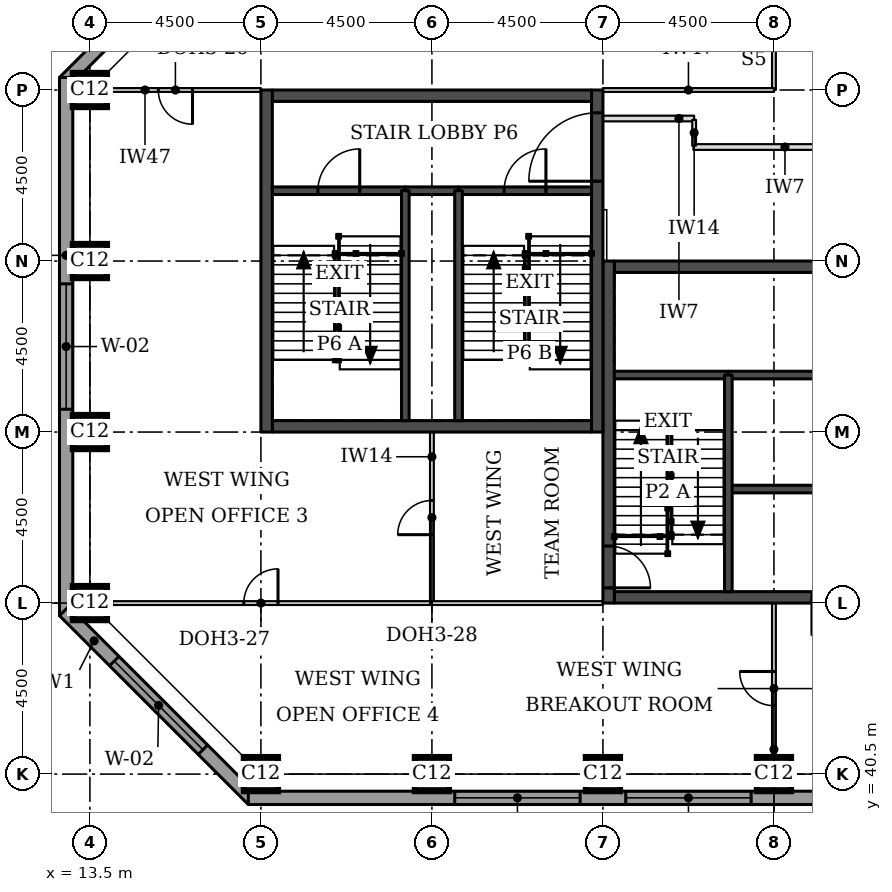
"""IFC4 building model, lengths in metres.
Left out: names, types, materials, properties, quantities, classifications, styles, units other than length and angle.
Written with IfcOpenShell. Run it as: python <this file> out.ifc"""

import sys

from ifc_helpers import new_model, si_unit, direction, frame, frame_2d, origin, origin_2d, place, context, subcontext, project, spatial, rectangle, extrude, element, fill, save


model = new_model("IFC4")
c1 = context("Model", 3, precision=1e-05, world=origin(), true_north=direction((0.0, 1.0)))
c2 = subcontext(c1, "Body", "Model", "MODEL_VIEW")
j1 = project(units=[si_unit("LENGTHUNIT", "METRE"), si_unit("PLANEANGLEUNIT", "RADIAN")], contexts=[c1])
p1 = place(None, origin())
s1 = spatial("IfcSite", under=j1, at=p1, CompositionType="ELEMENT")
p2 = place(p1, origin())
s2 = spatial("IfcBuilding", under=s1, at=p2, CompositionType="ELEMENT")
p3 = place(p2, frame((0.0, 0.0, 166.2)))
s3 = spatial("IfcBuildingStorey", under=s2, at=p3, CompositionType="ELEMENT", Elevation=166.2)
for number, where, z_axis, x_axis in (
    (1, (18.0, 40.5, 0.0), (0.0, 0.0, 1.0), (1.0, 0.0, 0.0)),
    (2, (22.5, 40.5, 0.0), (0.0, 0.0, 1.0), (1.0, 0.0, 0.0)),
    (3, (27.0, 40.5, 0.0), (0.0, 0.0, 1.0), (1.0, 0.0, 0.0)),
    (4, (31.5, 40.5, 0.0), (0.0, 0.0, 1.0), (1.0, 0.0, 0.0)),
    (5, (13.5, 45.0, 0.0), (0.0, 0.0, 1.0), (1.0, 0.0, 0.0)),
    (6, (13.5, 49.5, 0.0), (0.0, 0.0, 1.0), (1.0, 0.0, 0.0)),
    (7, (13.5, 54.0, 0.0), (0.0, 0.0, 1.0), (1.0, 0.0, 0.0)),
    (8, (13.5, 58.5, 0.0), (0.0, 0.0, 1.0), (1.0, 0.0, 0.0)),
):
    element("IfcColumn", number, at=place(p3, frame(where, z_axis=z_axis, x_axis=x_axis)), inside=s3, PredefinedType="COLUMN", context=c2, shape_type="SweptSolid", body=[
        extrude(rectangle(XDim=0.9, YDim=0.9, at=origin_2d()), origin(), (0.0, 0.0, 1.0), 3.7),
    ])
p4 = place(p3, frame((27.3, 45.15, 0.0), z_axis=(0.0, 0.0, 1.0), x_axis=(1.0, 0.0, 0.0)))
e9 = element("IfcWall", 9, at=p4, inside=s3, PredefinedType="SHEAR", context=c2, shape_type="SweptSolid", body=[
    extrude(rectangle(XDim=8.4, YDim=0.3, at=frame_2d((4.2, 0.0))), origin(), (0.0, 0.0, 1.0), 3.7),
])
p5 = place(p4, frame((5.2, 0.0, 0.0)))
e10 = element("IfcOpeningElement", 10, at=p5, cuts=e9, PredefinedType="OPENING", context=c2, shape_type="SweptSolid", body=[
    extrude(rectangle(XDim=1.0, YDim=2.1, at=frame_2d((0.5, 1.05))), frame((0.0, 0.16, 0.0), z_axis=(0.0, -1.0, 0.0), x_axis=(1.0, 0.0, 0.0)), (0.0, 0.0, 1.0), 0.32),
])
p6 = place(p3, frame((27.3, 53.85, 0.0), z_axis=(0.0, 0.0, 1.0), x_axis=(1.0, 0.0, 0.0)))
e11 = element("IfcWall", 11, at=p6, inside=s3, PredefinedType="SHEAR", context=c2, shape_type="SweptSolid", body=[
    extrude(rectangle(XDim=8.4, YDim=0.3, at=frame_2d((4.2, 0.0))), origin(), (0.0, 0.0, 1.0), 3.7),
])
p7 = place(p6, frame((6.4, 0.0, 0.0)))
e12 = element("IfcOpeningElement", 12, at=p7, cuts=e11, PredefinedType="OPENING", context=c2, shape_type="SweptSolid", body=[
    extrude(rectangle(XDim=1.1, YDim=2.1, at=frame_2d((0.55, 1.05))), frame((0.0, 0.16, 0.0), z_axis=(0.0, -1.0, 0.0), x_axis=(1.0, 0.0, 0.0)), (0.0, 0.0, 1.0), 0.32),
])
p8 = place(p3, frame((27.15, 45.0, 0.0), z_axis=(0.0, 0.0, 1.0), x_axis=(0.0, 1.0, 0.0)))
e13 = element("IfcWall", 13, at=p8, inside=s3, PredefinedType="SHEAR", context=c2, shape_type="SweptSolid", body=[
    extrude(rectangle(XDim=9.0, YDim=0.3, at=frame_2d((4.5, 0.0))), origin(), (0.0, 0.0, 1.0), 3.7),
])
p9 = place(p8, frame((0.4, 0.0, 0.0)))
e14 = element("IfcOpeningElement", 14, at=p9, cuts=e13, PredefinedType="OPENING", context=c2, shape_type="SweptSolid", body=[
    extrude(rectangle(XDim=1.1, YDim=2.1, at=frame_2d((0.55, 1.05))), frame((0.0, 0.16, 0.0), z_axis=(0.0, -1.0, 0.0), x_axis=(1.0, 0.0, 0.0)), (0.0, 0.0, 1.0), 0.32),
])
for number, where, z_axis, x_axis in (
    (15, (18.3, 49.65, 0.0), (0.0, 0.0, 1.0), (1.0, 0.0, 0.0)),
    (16, (18.3, 58.35, 0.0), (0.0, 0.0, 1.0), (1.0, 0.0, 0.0)),
):
    element("IfcWall", number, at=place(p3, frame(where, z_axis=z_axis, x_axis=x_axis)), inside=s3, PredefinedType="SHEAR", context=c2, shape_type="SweptSolid", body=[
        extrude(rectangle(XDim=8.4, YDim=0.3, at=frame_2d((4.2, 0.0))), origin(), (0.0, 0.0, 1.0), 3.7),
    ])
p10 = place(p3, frame((18.15, 49.5, 0.0), z_axis=(0.0, 0.0, 1.0), x_axis=(0.0, 1.0, 0.0)))
e17 = element("IfcWall", 17, at=p10, inside=s3, PredefinedType="SHEAR", context=c2, shape_type="SweptSolid", body=[
    extrude(rectangle(XDim=9.0, YDim=0.3, at=frame_2d((4.5, 0.0))), origin(), (0.0, 0.0, 1.0), 3.7),
])
p11 = place(p3, frame((26.85, 49.5, 0.0), z_axis=(0.0, 0.0, 1.0), x_axis=(0.0, 1.0, 0.0)))
e18 = element("IfcWall", 18, at=p11, inside=s3, PredefinedType="SHEAR", context=c2, shape_type="SweptSolid", body=[
    extrude(rectangle(XDim=9.0, YDim=0.3, at=frame_2d((4.5, 0.0))), origin(), (0.0, 0.0, 1.0), 3.7),
])
p12 = place(p11, frame((6.6, 0.0, 0.0)))
e19 = element("IfcOpeningElement", 19, at=p12, cuts=e18, PredefinedType="OPENING", context=c2, shape_type="SweptSolid", body=[
    extrude(rectangle(XDim=1.8, YDim=2.1, at=frame_2d((0.9, 1.05))), frame((0.0, 0.16, 0.0), z_axis=(0.0, -1.0, 0.0), x_axis=(1.0, 0.0, 0.0)), (0.0, 0.0, 1.0), 0.32),
])
p13 = place(p3, frame((17.792, 63.676, 0.0), z_axis=(0.0, 0.0, 1.0), x_axis=(-0.707106781187, -0.707106781187, 0.0)))
e20 = element("IfcWall", 20, at=p13, inside=s3, PredefinedType="STANDARD", context=c2, shape_type="SweptSolid", body=[
    extrude(rectangle(XDim=7.027, YDim=0.35, at=frame_2d((3.513, 0.0))), origin(), (0.0, 0.0, 1.0), 3.525),
])
p14 = place(p13, frame((1.863, 0.0, 0.9)))
e21 = element("IfcOpeningElement", 21, at=p14, cuts=e20, PredefinedType="OPENING", context=c2, shape_type="SweptSolid", body=[
    extrude(rectangle(XDim=3.3, YDim=1.9, at=frame_2d((1.65, 0.95))), frame((0.0, 0.185, 0.0), z_axis=(0.0, -1.0, 0.0), x_axis=(1.0, 0.0, 0.0)), (0.0, 0.0, 1.0), 0.37),
])
p15 = place(p3, frame((12.875, 58.831, 0.0), z_axis=(0.0, 0.0, 1.0), x_axis=(0.0, -1.0, 0.0)))
e22 = element("IfcWall", 22, at=p15, inside=s3, PredefinedType="STANDARD", context=c2, shape_type="SweptSolid", body=[
    extrude(rectangle(XDim=14.163, YDim=0.35, at=frame_2d((7.081, 0.0))), origin(), (0.0, 0.0, 1.0), 3.525),
])
p16 = place(p15, frame((5.431, 0.0, 0.9)))
e23 = element("IfcOpeningElement", 23, at=p16, cuts=e22, PredefinedType="OPENING", context=c2, shape_type="SweptSolid", body=[
    extrude(rectangle(XDim=3.3, YDim=1.9, at=frame_2d((1.65, 0.95))), frame((0.0, 0.185, 0.0), z_axis=(0.0, -1.0, 0.0), x_axis=(1.0, 0.0, 0.0)), (0.0, 0.0, 1.0), 0.37),
])
p17 = place(p3, frame((12.824, 44.792, 0.0), z_axis=(0.0, 0.0, 1.0), x_axis=(0.707106781187, -0.707106781187, 0.0)))
e24 = element("IfcWall", 24, at=p17, inside=s3, PredefinedType="STANDARD", context=c2, shape_type="SweptSolid", body=[
    extrude(rectangle(XDim=7.027, YDim=0.35, at=frame_2d((3.513, 0.0))), origin(), (0.0, 0.0, 1.0), 3.525),
])
p18 = place(p17, frame((1.863, 0.0, 0.9)))
e25 = element("IfcOpeningElement", 25, at=p18, cuts=e24, PredefinedType="OPENING", context=c2, shape_type="SweptSolid", body=[
    extrude(rectangle(XDim=3.3, YDim=1.9, at=frame_2d((1.65, 0.95))), frame((0.0, 0.185, 0.0), z_axis=(0.0, -1.0, 0.0), x_axis=(1.0, 0.0, 0.0)), (0.0, 0.0, 1.0), 0.37),
])
p19 = place(p3, frame((17.669, 39.875, 0.0), z_axis=(0.0, 0.0, 1.0), x_axis=(1.0, 0.0, 0.0)))
e26 = element("IfcWall", 26, at=p19, inside=s3, PredefinedType="STANDARD", context=c2, shape_type="SweptSolid", body=[
    extrude(rectangle(XDim=18.331, YDim=0.35, at=frame_2d((9.166, 0.0))), origin(), (0.0, 0.0, 1.0), 3.525),
])
p20 = place(p19, frame((5.431, 0.0, 0.9)))
e27 = element("IfcOpeningElement", 27, at=p20, cuts=e26, PredefinedType="OPENING", context=c2, shape_type="SweptSolid", body=[
    extrude(rectangle(XDim=3.3, YDim=1.9, at=frame_2d((1.65, 0.95))), frame((0.0, 0.185, 0.0), z_axis=(0.0, -1.0, 0.0), x_axis=(1.0, 0.0, 0.0)), (0.0, 0.0, 1.0), 0.37),
])
p21 = place(p19, frame((9.931, 0.0, 0.9)))
e28 = element("IfcOpeningElement", 28, at=p21, cuts=e26, PredefinedType="OPENING", context=c2, shape_type="SweptSolid", body=[
    extrude(rectangle(XDim=3.3, YDim=1.9, at=frame_2d((1.65, 0.95))), frame((0.0, 0.185, 0.0), z_axis=(0.0, -1.0, 0.0), x_axis=(1.0, 0.0, 0.0)), (0.0, 0.0, 1.0), 0.37),
])
p22 = place(p3, frame((29.38, 57.0, 0.0), z_axis=(0.0, 0.0, 1.0), x_axis=(1.0, 0.0, 0.0)))
e29 = element("IfcWall", 29, at=p22, inside=s3, PredefinedType="PARTITIONING", context=c2, shape_type="SweptSolid", body=[
    extrude(rectangle(XDim=9.62, YDim=0.15, at=frame_2d((4.81, 0.0))), origin(), (0.0, 0.0, 1.0), 3.55),
])
p23 = place(p22, frame((5.13, 0.0, 0.0)))
e30 = element("IfcOpeningElement", 30, at=p23, cuts=e29, PredefinedType="OPENING", context=c2, shape_type="SweptSolid", body=[
    extrude(rectangle(XDim=1.0, YDim=2.1, at=frame_2d((0.5, 1.05))), frame((0.0, 0.085, 0.0), z_axis=(0.0, -1.0, 0.0), x_axis=(1.0, 0.0, 0.0)), (0.0, 0.0, 1.0), 0.17),
])
p24 = place(p3, frame((31.5, 63.0, 0.0), z_axis=(0.0, 0.0, 1.0), x_axis=(0.0, -1.0, 0.0)))
e31 = element("IfcWall", 31, at=p24, inside=s3, PredefinedType="PARTITIONING", context=c2, shape_type="SweptSolid", body=[
    extrude(rectangle(XDim=4.5, YDim=0.1, at=frame_2d((2.25, 0.0))), origin(), (0.0, 0.0, 1.0), 3.55),
])
p25 = place(p24, frame((1.8, 0.0, 0.0)))
e32 = element("IfcOpeningElement", 32, at=p25, cuts=e31, PredefinedType="OPENING", context=c2, shape_type="SweptSolid", body=[
    extrude(rectangle(XDim=0.9, YDim=2.1, at=frame_2d((0.45, 1.05))), frame((0.0, 0.06, 0.0), z_axis=(0.0, -1.0, 0.0), x_axis=(1.0, 0.0, 0.0)), (0.0, 0.0, 1.0), 0.12),
])
p26 = place(p3, frame((31.5, 58.5, 0.0), z_axis=(0.0, 0.0, 1.0), x_axis=(-1.0, 0.0, 0.0)))
e33 = element("IfcWall", 33, at=p26, inside=s3, PredefinedType="PARTITIONING", context=c2, shape_type="SweptSolid", body=[
    extrude(rectangle(XDim=4.5, YDim=0.1, at=frame_2d((2.25, 0.0))), origin(), (0.0, 0.0, 1.0), 2.55),
])
p27 = place(p3, frame((13.5, 58.5, 0.0), z_axis=(0.0, 0.0, 1.0), x_axis=(1.0, 0.0, 0.0)))
e34 = element("IfcWall", 34, at=p27, inside=s3, PredefinedType="PARTITIONING", context=c2, shape_type="SweptSolid", body=[
    extrude(rectangle(XDim=4.5, YDim=0.1, at=frame_2d((2.25, 0.0))), origin(), (0.0, 0.0, 1.0), 2.55),
])
p28 = place(p27, frame((1.8, 0.0, 0.0)))
e35 = element("IfcOpeningElement", 35, at=p28, cuts=e34, PredefinedType="OPENING", context=c2, shape_type="SweptSolid", body=[
    extrude(rectangle(XDim=0.9, YDim=2.1, at=frame_2d((0.45, 1.05))), frame((0.0, 0.06, 0.0), z_axis=(0.0, -1.0, 0.0), x_axis=(1.0, 0.0, 0.0)), (0.0, 0.0, 1.0), 0.12),
])
p29 = place(p3, frame((22.5, 45.0, 0.0), z_axis=(0.0, 0.0, 1.0), x_axis=(-1.0, 0.0, 0.0)))
e36 = element("IfcWall", 36, at=p29, inside=s3, PredefinedType="PARTITIONING", context=c2, shape_type="SweptSolid", body=[
    extrude(rectangle(XDim=9.0, YDim=0.1, at=frame_2d((4.5, 0.0))), origin(), (0.0, 0.0, 1.0), 2.55),
])
p30 = place(p29, frame((4.05, 0.0, 0.0)))
e37 = element("IfcOpeningElement", 37, at=p30, cuts=e36, PredefinedType="OPENING", context=c2, shape_type="SweptSolid", body=[
    extrude(rectangle(XDim=0.9, YDim=2.1, at=frame_2d((0.45, 1.05))), frame((0.0, 0.06, 0.0), z_axis=(0.0, -1.0, 0.0), x_axis=(1.0, 0.0, 0.0)), (0.0, 0.0, 1.0), 0.12),
])
p31 = place(p3, frame((22.5, 49.5, 0.0), z_axis=(0.0, 0.0, 1.0), x_axis=(0.0, -1.0, 0.0)))
e38 = element("IfcWall", 38, at=p31, inside=s3, PredefinedType="PARTITIONING", context=c2, shape_type="SweptSolid", body=[
    extrude(rectangle(XDim=4.5, YDim=0.1, at=frame_2d((2.25, 0.0))), origin(), (0.0, 0.0, 1.0), 3.55),
])
p32 = place(p31, frame((1.8, 0.0, 0.0)))
e39 = element("IfcOpeningElement", 39, at=p32, cuts=e38, PredefinedType="OPENING", context=c2, shape_type="SweptSolid", body=[
    extrude(rectangle(XDim=0.9, YDim=2.1, at=frame_2d((0.45, 1.05))), frame((0.0, 0.06, 0.0), z_axis=(0.0, -1.0, 0.0), x_axis=(1.0, 0.0, 0.0)), (0.0, 0.0, 1.0), 0.12),
])
p33 = place(p3, frame((22.5, 45.0, 0.0), z_axis=(0.0, 0.0, 1.0), x_axis=(1.0, 0.0, 0.0)))
e40 = element("IfcWall", 40, at=p33, inside=s3, PredefinedType="PARTITIONING", context=c2, shape_type="SweptSolid", body=[
    extrude(rectangle(XDim=4.5, YDim=0.1, at=frame_2d((2.25, 0.0))), origin(), (0.0, 0.0, 1.0), 2.55),
])
p34 = place(p3, frame((31.5, 45.0, 0.0), z_axis=(0.0, 0.0, 1.0), x_axis=(0.0, -1.0, 0.0)))
e41 = element("IfcWall", 41, at=p34, inside=s3, PredefinedType="PARTITIONING", context=c2, shape_type="SweptSolid", body=[
    extrude(rectangle(XDim=4.5, YDim=0.1, at=frame_2d((2.25, 0.0))), origin(), (0.0, 0.0, 1.0), 3.55),
])
p35 = place(p34, frame((1.8, 0.0, 0.0)))
e42 = element("IfcOpeningElement", 42, at=p35, cuts=e41, PredefinedType="OPENING", context=c2, shape_type="SweptSolid", body=[
    extrude(rectangle(XDim=0.9, YDim=2.1, at=frame_2d((0.45, 1.05))), frame((0.0, 0.06, 0.0), z_axis=(0.0, -1.0, 0.0), x_axis=(1.0, 0.0, 0.0)), (0.0, 0.0, 1.0), 0.12),
])
p36 = place(p3, frame((27.0, 57.75, 0.0), z_axis=(0.0, 0.0, 1.0), x_axis=(1.0, 0.0, 0.0)))
e43 = element("IfcWall", 43, at=p36, inside=s3, PredefinedType="PARTITIONING", context=c2, shape_type="SweptSolid", body=[
    extrude(rectangle(XDim=2.4, YDim=0.15, at=frame_2d((1.2, 0.0))), origin(), (0.0, 0.0, 1.0), 3.55),
])
p37 = place(p3, frame((29.4, 57.715, 0.0), z_axis=(0.0, 0.0, 1.0), x_axis=(0.0, -1.0, 0.0)))
e44 = element("IfcWall", 44, at=p37, inside=s3, PredefinedType="PARTITIONING", context=c2, shape_type="SweptSolid", body=[
    extrude(rectangle(XDim=0.68, YDim=0.1, at=frame_2d((0.34, 0.0))), origin(), (0.0, 0.0, 1.0), 3.55),
])
p38 = place(p3, frame((30.3, 48.0, 0.0), z_axis=(0.0, 0.0, 1.0), x_axis=(1.0, 0.0, 0.0)))
e45 = element("IfcWall", 45, at=p38, inside=s3, PredefinedType="SOLIDWALL", context=c2, shape_type="SweptSolid", body=[
    extrude(rectangle(XDim=2.4, YDim=0.2, at=frame_2d((1.2, 0.0))), origin(), (0.0, 0.0, 1.0), 3.55),
])
p39 = place(p3, frame((30.3, 51.0, 0.0), z_axis=(0.0, 0.0, 1.0), x_axis=(1.0, 0.0, 0.0)))
e46 = element("IfcWall", 46, at=p39, inside=s3, PredefinedType="SOLIDWALL", context=c2, shape_type="SweptSolid", body=[
    extrude(rectangle(XDim=2.4, YDim=0.2, at=frame_2d((1.2, 0.0))), origin(), (0.0, 0.0, 1.0), 3.7),
])
p40 = place(p3, frame((27.3, 51.0, 0.0), z_axis=(0.0, 0.0, 1.0), x_axis=(1.0, 0.0, 0.0)))
e47 = element("IfcWall", 47, at=p40, inside=s3, PredefinedType="SOLIDWALL", context=c2, shape_type="SweptSolid", body=[
    extrude(rectangle(XDim=3.0, YDim=0.2, at=frame_2d((1.5, 0.0))), origin(), (0.0, 0.0, 1.0), 3.55),
])
p41 = place(p3, frame((30.3, 45.3, 0.0), z_axis=(0.0, 0.0, 1.0), x_axis=(0.0, 1.0, 0.0)))
e48 = element("IfcWall", 48, at=p41, inside=s3, PredefinedType="SOLIDWALL", context=c2, shape_type="SweptSolid", body=[
    extrude(rectangle(XDim=5.7, YDim=0.2, at=frame_2d((2.85, 0.0))), origin(), (0.0, 0.0, 1.0), 3.55),
])
p42 = place(p3, frame((21.8, 55.85, 0.0), z_axis=(0.0, 0.0, 1.0), x_axis=(1.0, 0.0, 0.0)))
e49 = element("IfcWall", 49, at=p42, inside=s3, PredefinedType="SOLIDWALL", context=c2, shape_type="SweptSolid", body=[
    extrude(rectangle(XDim=1.4, YDim=0.2, at=frame_2d((0.7, 0.0))), origin(), (0.0, 0.0, 1.0), 3.55),
])
p43 = place(p3, frame((18.3, 55.85, 0.0), z_axis=(0.0, 0.0, 1.0), x_axis=(1.0, 0.0, 0.0)))
e50 = element("IfcWall", 50, at=p43, inside=s3, PredefinedType="SOLIDWALL", context=c2, shape_type="SweptSolid", body=[
    extrude(rectangle(XDim=3.5, YDim=0.2, at=frame_2d((1.75, 0.0))), origin(), (0.0, 0.0, 1.0), 3.55),
])
p44 = place(p43, frame((1.2, 0.0, 0.0)))
e51 = element("IfcOpeningElement", 51, at=p44, cuts=e50, PredefinedType="OPENING", context=c2, shape_type="SweptSolid", body=[
    extrude(rectangle(XDim=1.1, YDim=2.1, at=frame_2d((0.55, 1.05))), frame((0.0, 0.11, 0.0), z_axis=(0.0, -1.0, 0.0), x_axis=(1.0, 0.0, 0.0)), (0.0, 0.0, 1.0), 0.22),
])
p45 = place(p3, frame((23.2, 55.85, 0.0), z_axis=(0.0, 0.0, 1.0), x_axis=(1.0, 0.0, 0.0)))
e52 = element("IfcWall", 52, at=p45, inside=s3, PredefinedType="SOLIDWALL", context=c2, shape_type="SweptSolid", body=[
    extrude(rectangle(XDim=3.5, YDim=0.2, at=frame_2d((1.75, 0.0))), origin(), (0.0, 0.0, 1.0), 3.55),
])
p46 = place(p45, frame((1.2, 0.0, 0.0)))
e53 = element("IfcOpeningElement", 53, at=p46, cuts=e52, PredefinedType="OPENING", context=c2, shape_type="SweptSolid", body=[
    extrude(rectangle(XDim=1.1, YDim=2.1, at=frame_2d((0.55, 1.05))), frame((0.0, 0.11, 0.0), z_axis=(0.0, -1.0, 0.0), x_axis=(1.0, 0.0, 0.0)), (0.0, 0.0, 1.0), 0.22),
])
for number, where, z_axis, x_axis in (
    (54, (21.8, 49.8, 0.0), (0.0, 0.0, 1.0), (0.0, 1.0, 0.0)),
    (55, (23.2, 49.8, 0.0), (0.0, 0.0, 1.0), (0.0, 1.0, 0.0)),
):
    element("IfcWall", number, at=place(p3, frame(where, z_axis=z_axis, x_axis=x_axis)), inside=s3, PredefinedType="SOLIDWALL", context=c2, shape_type="SweptSolid", body=[
        extrude(rectangle(XDim=6.05, YDim=0.2, at=frame_2d((3.025, 0.0))), origin(), (0.0, 0.0, 1.0), 3.55),
    ])
p47 = place(p16, origin())
e56 = element("IfcWindow", 56, at=p47, inside=s3, PartitioningType="SINGLE_PANEL", PredefinedType="WINDOW", context=c2, shape_type="SweptSolid", body=[
    extrude(rectangle(XDim=3.3, YDim=1.9, at=frame_2d((1.65, 0.95))), frame((0.0, 0.085, 0.0), z_axis=(0.0, -1.0, 0.0), x_axis=(1.0, 0.0, 0.0)), (0.0, 0.0, 1.0), 0.06),
])
fill(e23, e56)
p48 = place(p18, origin())
e57 = element("IfcWindow", 57, at=p48, inside=s3, PartitioningType="SINGLE_PANEL", PredefinedType="WINDOW", context=c2, shape_type="SweptSolid", body=[
    extrude(rectangle(XDim=3.3, YDim=1.9, at=frame_2d((1.65, 0.95))), frame((0.0, 0.085, 0.0), z_axis=(0.0, -1.0, 0.0), x_axis=(1.0, 0.0, 0.0)), (0.0, 0.0, 1.0), 0.06),
])
fill(e25, e57)
p49 = place(p20, origin())
e58 = element("IfcWindow", 58, at=p49, inside=s3, PartitioningType="SINGLE_PANEL", PredefinedType="WINDOW", context=c2, shape_type="SweptSolid", body=[
    extrude(rectangle(XDim=3.3, YDim=1.9, at=frame_2d((1.65, 0.95))), frame((0.0, 0.085, 0.0), z_axis=(0.0, -1.0, 0.0), x_axis=(1.0, 0.0, 0.0)), (0.0, 0.0, 1.0), 0.06),
])
fill(e27, e58)
p50 = place(p21, origin())
e59 = element("IfcWindow", 59, at=p50, inside=s3, PartitioningType="SINGLE_PANEL", PredefinedType="WINDOW", context=c2, shape_type="SweptSolid", body=[
    extrude(rectangle(XDim=3.3, YDim=1.9, at=frame_2d((1.65, 0.95))), frame((0.0, 0.085, 0.0), z_axis=(0.0, -1.0, 0.0), x_axis=(1.0, 0.0, 0.0)), (0.0, 0.0, 1.0), 0.06),
])
fill(e28, e59)
p51 = place(p28, frame((0.9, 0.0, 0.0), z_axis=(0.0, 0.0, 1.0), x_axis=(-1.0, 0.0, 0.0)))
e60 = element("IfcDoor", 60, at=p51, inside=s3, OperationType="SINGLE_SWING_LEFT", PredefinedType="DOOR", context=c2, shape_type="SweptSolid", body=[
    extrude(rectangle(XDim=0.9, YDim=2.1, at=frame_2d((0.45, 1.05))), frame((0.0, 0.025, 0.0), z_axis=(0.0, -1.0, 0.0), x_axis=(1.0, 0.0, 0.0)), (0.0, 0.0, 1.0), 0.05),
])
fill(e35, e60)
p52 = place(p30, frame((0.9, 0.0, 0.0), z_axis=(0.0, 0.0, 1.0), x_axis=(-1.0, 0.0, 0.0)))
e61 = element("IfcDoor", 61, at=p52, inside=s3, OperationType="SINGLE_SWING_RIGHT", PredefinedType="DOOR", context=c2, shape_type="SweptSolid", body=[
    extrude(rectangle(XDim=0.9, YDim=2.1, at=frame_2d((0.45, 1.05))), frame((0.0, 0.025, 0.0), z_axis=(0.0, -1.0, 0.0), x_axis=(1.0, 0.0, 0.0)), (0.0, 0.0, 1.0), 0.05),
])
fill(e37, e61)
p53 = place(p32, frame((0.9, 0.0, 0.0), z_axis=(0.0, 0.0, 1.0), x_axis=(-1.0, 0.0, 0.0)))
e62 = element("IfcDoor", 62, at=p53, inside=s3, OperationType="SINGLE_SWING_LEFT", PredefinedType="DOOR", context=c2, shape_type="SweptSolid", body=[
    extrude(rectangle(XDim=0.9, YDim=2.1, at=frame_2d((0.45, 1.05))), frame((0.0, 0.025, 0.0), z_axis=(0.0, -1.0, 0.0), x_axis=(1.0, 0.0, 0.0)), (0.0, 0.0, 1.0), 0.05),
])
fill(e39, e62)
p54 = place(p35, frame((0.9, 0.0, 0.0), z_axis=(0.0, 0.0, 1.0), x_axis=(-1.0, 0.0, 0.0)))
e63 = element("IfcDoor", 63, at=p54, inside=s3, OperationType="SINGLE_SWING_RIGHT", PredefinedType="DOOR", context=c2, shape_type="SweptSolid", body=[
    extrude(rectangle(XDim=0.9, YDim=2.1, at=frame_2d((0.45, 1.05))), frame((0.0, 0.025, 0.0), z_axis=(0.0, -1.0, 0.0), x_axis=(1.0, 0.0, 0.0)), (0.0, 0.0, 1.0), 0.05),
])
fill(e42, e63)
p55 = place(p9, frame((1.1, 0.0, 0.0), z_axis=(0.0, 0.0, 1.0), x_axis=(-1.0, 0.0, 0.0)))
e64 = element("IfcDoor", 64, at=p55, inside=s3, OperationType="SINGLE_SWING_RIGHT", PredefinedType="DOOR", context=c2, shape_type="SweptSolid", body=[
    extrude(rectangle(XDim=1.1, YDim=2.1, at=frame_2d((0.55, 1.05))), frame((0.0, 0.025, 0.0), z_axis=(0.0, -1.0, 0.0), x_axis=(1.0, 0.0, 0.0)), (0.0, 0.0, 1.0), 0.05),
])
fill(e14, e64)
p56 = place(p44, origin())
e65 = element("IfcDoor", 65, at=p56, inside=s3, OperationType="SINGLE_SWING_RIGHT", PredefinedType="DOOR", context=c2, shape_type="SweptSolid", body=[
    extrude(rectangle(XDim=1.1, YDim=2.1, at=frame_2d((0.55, 1.05))), frame((0.0, 0.025, 0.0), z_axis=(0.0, -1.0, 0.0), x_axis=(1.0, 0.0, 0.0)), (0.0, 0.0, 1.0), 0.05),
])
fill(e51, e65)
p57 = place(p46, origin())
e66 = element("IfcDoor", 66, at=p57, inside=s3, OperationType="SINGLE_SWING_RIGHT", PredefinedType="DOOR", context=c2, shape_type="SweptSolid", body=[
    extrude(rectangle(XDim=1.1, YDim=2.1, at=frame_2d((0.55, 1.05))), frame((0.0, 0.025, 0.0), z_axis=(0.0, -1.0, 0.0), x_axis=(1.0, 0.0, 0.0)), (0.0, 0.0, 1.0), 0.05),
])
fill(e53, e66)
p58 = place(p12, origin())
e67 = element("IfcDoor", 67, at=p58, inside=s3, OperationType="SINGLE_SWING_LEFT", PredefinedType="DOOR", context=c2, shape_type="SweptSolid", body=[
    extrude(rectangle(XDim=1.8, YDim=2.1, at=frame_2d((0.9, 1.05))), frame((0.0, 0.025, 0.0), z_axis=(0.0, -1.0, 0.0), x_axis=(1.0, 0.0, 0.0)), (0.0, 0.0, 1.0), 0.05),
])
fill(e19, e67)
save(model, sys.argv[1])
